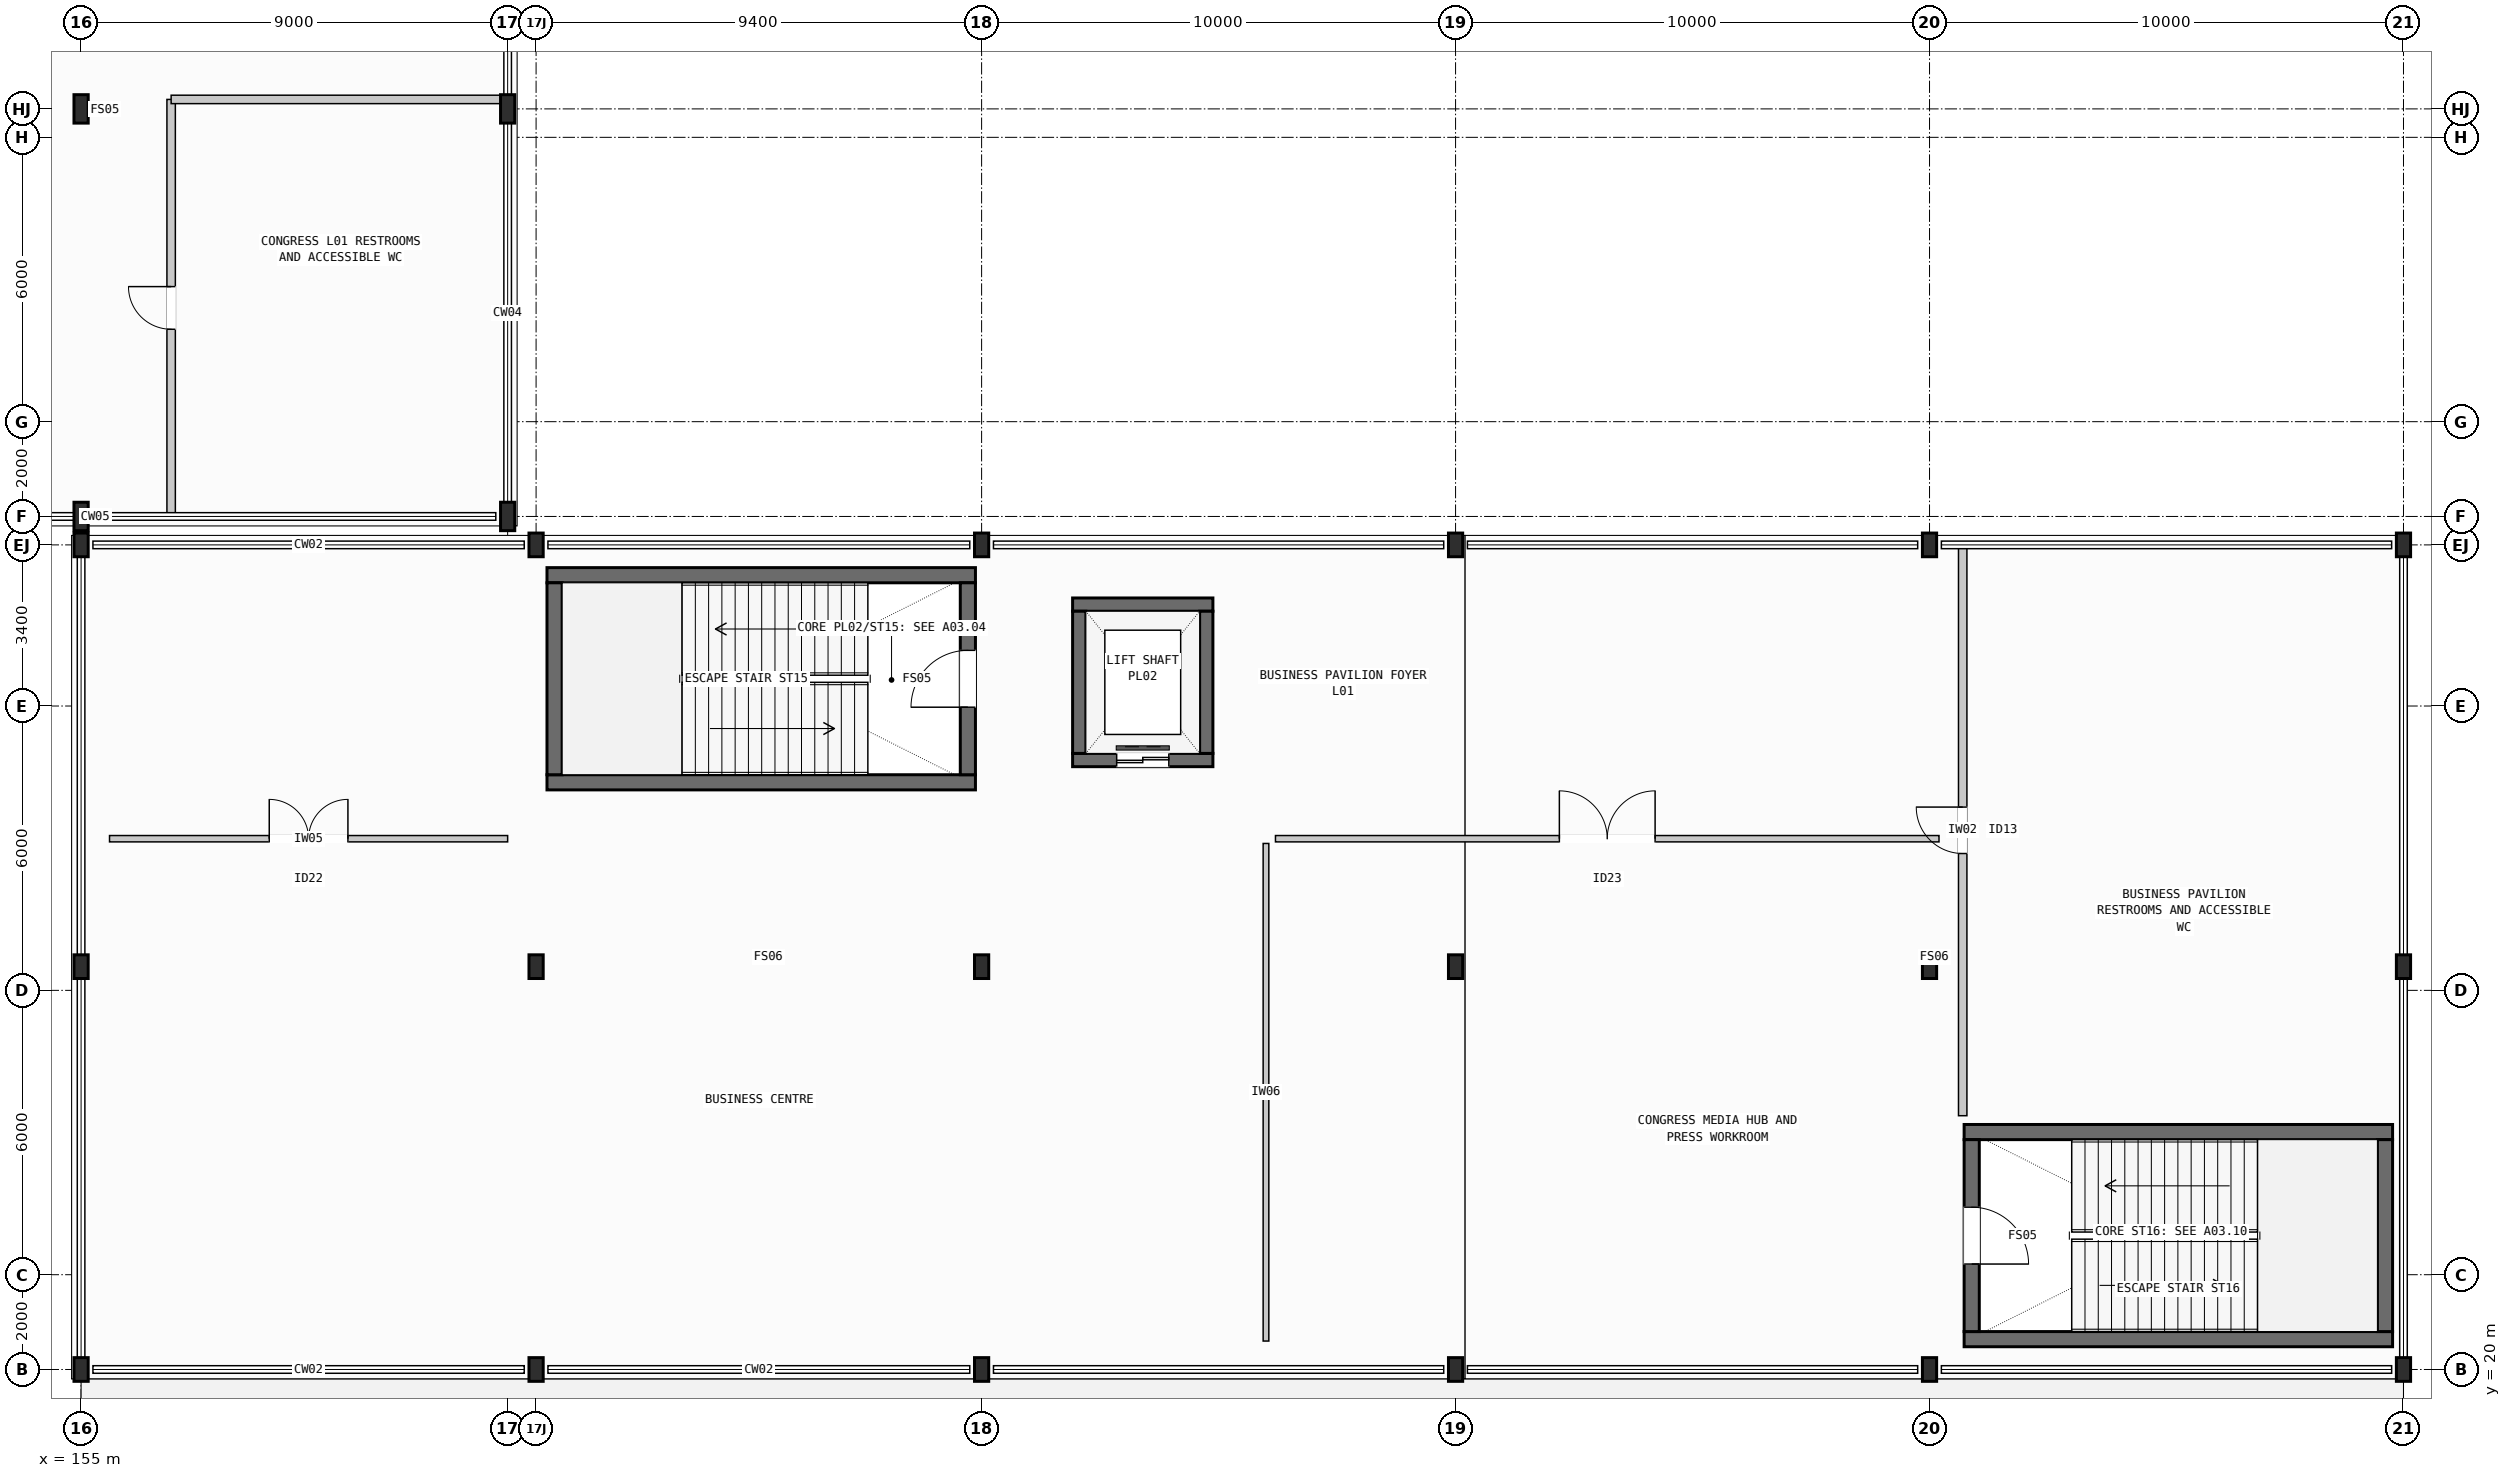
"""IFC4 building model, lengths in metres.
Left out: names, types, materials, properties, quantities, classifications, styles, units other than length and angle.
Written with IfcOpenShell. Run it as: python <this file> out.ifc"""

import sys

from ifc_helpers import new_model, si_unit, direction, frame, frame_2d, origin, origin_2d, place, context, subcontext, project, spatial, rectangle, i_section, extrude, element, fill, save


model = new_model("IFC4")
c1 = context("Model", 3, precision=1e-05, world=origin(), true_north=direction((0.0, 1.0)))
c2 = subcontext(c1, "Body", "Model", "MODEL_VIEW")
j1 = project(units=[si_unit("LENGTHUNIT", "METRE"), si_unit("PLANEANGLEUNIT", "RADIAN")], contexts=[c1])
p1 = place(None, origin())
s1 = spatial("IfcSite", under=j1, at=p1, CompositionType="ELEMENT")
p2 = place(p1, origin())
s2 = spatial("IfcBuilding", under=s1, at=p2, CompositionType="ELEMENT")
p3 = place(p2, frame((0.0, 0.0, 6.0)))
s3 = spatial("IfcBuildingStorey", under=s2, at=p3, CompositionType="ELEMENT", Elevation=6.0)
for number, where, z_axis, x_axis in (
    (1, (155.0, 20.0, 0.0), (0.0, 0.0, 1.0), (1.0, 0.0, 0.0)),
    (2, (155.0, 28.5, 0.0), (0.0, 0.0, 1.0), (1.0, 0.0, 0.0)),
    (3, (155.0, 37.4, 0.0), (0.0, 0.0, 1.0), (1.0, 0.0, 0.0)),
):
    element("IfcColumn", number, at=place(p3, frame(where, z_axis=z_axis, x_axis=x_axis)), inside=s3, PredefinedType="COLUMN", context=c2, shape_type="SweptSolid", body=[
        extrude(i_section(OverallWidth=0.3, OverallDepth=0.5, WebThickness=0.014, FlangeThickness=0.028, FilletRadius=0.027, at=origin_2d()), origin(), (0.0, 0.0, 1.0), 5.4),
    ])
for number, where, z_axis, x_axis in (
    (4, (155.0, 38.0, 0.0), (0.0, 0.0, 1.0), (1.0, 0.0, 0.0)),
    (5, (155.0, 46.6, 0.0), (0.0, 0.0, 1.0), (1.0, 0.0, 0.0)),
    (6, (164.0, 38.0, 0.0), (0.0, 0.0, 1.0), (1.0, 0.0, 0.0)),
    (7, (164.0, 46.6, 0.0), (0.0, 0.0, 1.0), (1.0, 0.0, 0.0)),
):
    element("IfcColumn", number, at=place(p3, frame(where, z_axis=z_axis, x_axis=x_axis)), inside=s3, PredefinedType="COLUMN", context=c2, shape_type="SweptSolid", body=[
        extrude(i_section(OverallWidth=0.3, OverallDepth=0.6, WebThickness=0.015, FlangeThickness=0.03, FilletRadius=0.027, at=origin_2d()), origin(), (0.0, 0.0, 1.0), 5.4),
    ])
for number, where, z_axis, x_axis in (
    (8, (164.6, 20.0, 0.0), (0.0, 0.0, 1.0), (1.0, 0.0, 0.0)),
    (9, (164.6, 28.5, 0.0), (0.0, 0.0, 1.0), (1.0, 0.0, 0.0)),
    (10, (164.6, 37.4, 0.0), (0.0, 0.0, 1.0), (1.0, 0.0, 0.0)),
    (11, (174.0, 20.0, 0.0), (0.0, 0.0, 1.0), (1.0, 0.0, 0.0)),
    (12, (174.0, 28.5, 0.0), (0.0, 0.0, 1.0), (1.0, 0.0, 0.0)),
    (13, (174.0, 37.4, 0.0), (0.0, 0.0, 1.0), (1.0, 0.0, 0.0)),
    (14, (184.0, 20.0, 0.0), (0.0, 0.0, 1.0), (1.0, 0.0, 0.0)),
    (15, (184.0, 28.5, 0.0), (0.0, 0.0, 1.0), (1.0, 0.0, 0.0)),
    (16, (184.0, 37.4, 0.0), (0.0, 0.0, 1.0), (1.0, 0.0, 0.0)),
    (17, (194.0, 20.0, 0.0), (0.0, 0.0, 1.0), (1.0, 0.0, 0.0)),
    (18, (194.0, 28.5, 0.0), (0.0, 0.0, 1.0), (1.0, 0.0, 0.0)),
    (19, (194.0, 37.4, 0.0), (0.0, 0.0, 1.0), (1.0, 0.0, 0.0)),
    (20, (204.0, 20.0, 0.0), (0.0, 0.0, 1.0), (1.0, 0.0, 0.0)),
    (21, (204.0, 28.5, 0.0), (0.0, 0.0, 1.0), (1.0, 0.0, 0.0)),
    (22, (204.0, 37.4, 0.0), (0.0, 0.0, 1.0), (1.0, 0.0, 0.0)),
):
    element("IfcColumn", number, at=place(p3, frame(where, z_axis=z_axis, x_axis=x_axis)), inside=s3, PredefinedType="COLUMN", context=c2, shape_type="SweptSolid", body=[
        extrude(i_section(OverallWidth=0.3, OverallDepth=0.5, WebThickness=0.014, FlangeThickness=0.028, FilletRadius=0.027, at=origin_2d()), origin(), (0.0, 0.0, 1.0), 5.4),
    ])
for number, where, z_axis, x_axis in (
    (23, (164.83, 32.39, 0.0), (0.0, 0.0, 1.0), (1.0, 0.0, 0.0)),
    (24, (164.83, 36.76, 0.0), (0.0, 0.0, 1.0), (1.0, 0.0, 0.0)),
):
    element("IfcWall", number, at=place(p3, frame(where, z_axis=z_axis, x_axis=x_axis)), inside=s3, PredefinedType="SHEAR", context=c2, shape_type="SweptSolid", body=[
        extrude(rectangle(XDim=9.04, YDim=0.32, at=frame_2d((4.52, 0.0))), origin(), (0.0, 0.0, 1.0), 5.4),
    ])
p4 = place(p3, frame((164.99, 32.55, 0.0), z_axis=(0.0, 0.0, 1.0), x_axis=(0.0, 1.0, 0.0)))
e25 = element("IfcWall", 25, at=p4, inside=s3, PredefinedType="SHEAR", context=c2, shape_type="SweptSolid", body=[
    extrude(rectangle(XDim=4.05, YDim=0.32, at=frame_2d((2.025, 0.0))), origin(), (0.0, 0.0, 1.0), 5.4),
])
p5 = place(p3, frame((173.71, 32.55, 0.0), z_axis=(0.0, 0.0, 1.0), x_axis=(0.0, 1.0, 0.0)))
e26 = element("IfcWall", 26, at=p5, inside=s3, PredefinedType="SHEAR", context=c2, shape_type="SweptSolid", body=[
    extrude(rectangle(XDim=4.05, YDim=0.32, at=frame_2d((2.025, 0.0))), origin(), (0.0, 0.0, 1.0), 5.4),
])
p6 = place(p5, frame((1.425, 0.0, 0.0)))
e27 = element("IfcOpeningElement", 27, at=p6, cuts=e26, PredefinedType="OPENING", context=c2, shape_type="SweptSolid", body=[
    extrude(rectangle(XDim=1.2, YDim=2.2, at=frame_2d((0.6, 1.1))), frame((0.0, 0.17, 0.0), z_axis=(0.0, -1.0, 0.0), x_axis=(1.0, 0.0, 0.0)), (0.0, 0.0, 1.0), 0.34),
])
for number, where, z_axis, x_axis in (
    (28, (194.73, 20.64, 0.0), (0.0, 0.0, 1.0), (1.0, 0.0, 0.0)),
    (29, (194.73, 25.01, 0.0), (0.0, 0.0, 1.0), (1.0, 0.0, 0.0)),
):
    element("IfcWall", number, at=place(p3, frame(where, z_axis=z_axis, x_axis=x_axis)), inside=s3, PredefinedType="SHEAR", context=c2, shape_type="SweptSolid", body=[
        extrude(rectangle(XDim=9.04, YDim=0.32, at=frame_2d((4.52, 0.0))), origin(), (0.0, 0.0, 1.0), 5.4),
    ])
p7 = place(p3, frame((194.89, 20.8, 0.0), z_axis=(0.0, 0.0, 1.0), x_axis=(0.0, 1.0, 0.0)))
e30 = element("IfcWall", 30, at=p7, inside=s3, PredefinedType="SHEAR", context=c2, shape_type="SweptSolid", body=[
    extrude(rectangle(XDim=4.05, YDim=0.32, at=frame_2d((2.025, 0.0))), origin(), (0.0, 0.0, 1.0), 5.4),
])
p8 = place(p7, frame((1.425, 0.0, 0.0)))
e31 = element("IfcOpeningElement", 31, at=p8, cuts=e30, PredefinedType="OPENING", context=c2, shape_type="SweptSolid", body=[
    extrude(rectangle(XDim=1.2, YDim=2.2, at=frame_2d((0.6, 1.1))), frame((0.0, 0.17, 0.0), z_axis=(0.0, -1.0, 0.0), x_axis=(1.0, 0.0, 0.0)), (0.0, 0.0, 1.0), 0.34),
])
p9 = place(p3, frame((203.61, 20.8, 0.0), z_axis=(0.0, 0.0, 1.0), x_axis=(0.0, 1.0, 0.0)))
e32 = element("IfcWall", 32, at=p9, inside=s3, PredefinedType="SHEAR", context=c2, shape_type="SweptSolid", body=[
    extrude(rectangle(XDim=4.05, YDim=0.32, at=frame_2d((2.025, 0.0))), origin(), (0.0, 0.0, 1.0), 5.4),
])
p10 = place(p3, frame((175.92, 32.86, 0.0), z_axis=(0.0, 0.0, 1.0), x_axis=(1.0, 0.0, 0.0)))
e33 = element("IfcWall", 33, at=p10, inside=s3, PredefinedType="SHEAR", context=c2, shape_type="SweptSolid", body=[
    extrude(rectangle(XDim=2.96, YDim=0.28, at=frame_2d((1.48, 0.0))), origin(), (0.0, 0.0, 1.0), 5.4),
])
p11 = place(p10, frame((0.93, 0.0, 0.0)))
e34 = element("IfcOpeningElement", 34, at=p11, cuts=e33, PredefinedType="OPENING", context=c2, shape_type="SweptSolid", body=[
    extrude(rectangle(XDim=1.1, YDim=2.15, at=frame_2d((0.55, 1.075))), frame((0.0, 0.15, 0.0), z_axis=(0.0, -1.0, 0.0), x_axis=(1.0, 0.0, 0.0)), (0.0, 0.0, 1.0), 0.3),
])
p12 = place(p3, frame((175.92, 36.14, 0.0), z_axis=(0.0, 0.0, 1.0), x_axis=(1.0, 0.0, 0.0)))
e35 = element("IfcWall", 35, at=p12, inside=s3, PredefinedType="SHEAR", context=c2, shape_type="SweptSolid", body=[
    extrude(rectangle(XDim=2.96, YDim=0.28, at=frame_2d((1.48, 0.0))), origin(), (0.0, 0.0, 1.0), 5.4),
])
for number, where, z_axis, x_axis in (
    (36, (176.06, 33.0, 0.0), (0.0, 0.0, 1.0), (0.0, 1.0, 0.0)),
    (37, (178.74, 33.0, 0.0), (0.0, 0.0, 1.0), (0.0, 1.0, 0.0)),
):
    element("IfcWall", number, at=place(p3, frame(where, z_axis=z_axis, x_axis=x_axis)), inside=s3, PredefinedType="SHEAR", context=c2, shape_type="SweptSolid", body=[
        extrude(rectangle(XDim=3.0, YDim=0.28, at=frame_2d((1.5, 0.0))), origin(), (0.0, 0.0, 1.0), 5.4),
    ])
p13 = place(p3, frame((156.9, 38.0, 0.0), z_axis=(0.0, 0.0, 1.0), x_axis=(0.0, 1.0, 0.0)))
e38 = element("IfcWall", 38, at=p13, inside=s3, PredefinedType="PARTITIONING", context=c2, shape_type="SweptSolid", body=[
    extrude(rectangle(XDim=8.8, YDim=0.178, at=frame_2d((4.4, 0.0))), origin(), (0.0, 0.0, 1.0), 4.4),
])
p14 = place(p13, frame((3.95, 0.0, 0.0)))
e39 = element("IfcOpeningElement", 39, at=p14, cuts=e38, PredefinedType="OPENING", context=c2, shape_type="SweptSolid", body=[
    extrude(rectangle(XDim=0.9, YDim=2.08, at=frame_2d((0.45, 1.04))), frame((0.0, 0.099, 0.0), z_axis=(0.0, -1.0, 0.0), x_axis=(1.0, 0.0, 0.0)), (0.0, 0.0, 1.0), 0.198),
])
p15 = place(p3, frame((156.9, 46.8, 0.0), z_axis=(0.0, 0.0, 1.0), x_axis=(1.0, 0.0, 0.0)))
e40 = element("IfcWall", 40, at=p15, inside=s3, PredefinedType="PARTITIONING", context=c2, shape_type="SweptSolid", body=[
    extrude(rectangle(XDim=7.1, YDim=0.178, at=frame_2d((3.55, 0.0))), origin(), (0.0, 0.0, 1.0), 4.4),
])
p16 = place(p3, frame((155.6, 31.2, 0.0), z_axis=(0.0, 0.0, 1.0), x_axis=(1.0, 0.0, 0.0)))
e41 = element("IfcWall", 41, at=p16, inside=s3, PredefinedType="PARTITIONING", context=c2, shape_type="SweptSolid", body=[
    extrude(rectangle(XDim=8.4, YDim=0.134, at=frame_2d((4.2, 0.0))), origin(), (0.0, 0.0, 1.0), 4.4),
])
p17 = place(p16, frame((3.37, 0.0, 0.0)))
e42 = element("IfcOpeningElement", 42, at=p17, cuts=e41, PredefinedType="OPENING", context=c2, shape_type="SweptSolid", body=[
    extrude(rectangle(XDim=1.66, YDim=2.38, at=frame_2d((0.83, 1.19))), frame((0.0, 0.077, 0.0), z_axis=(0.0, -1.0, 0.0), x_axis=(1.0, 0.0, 0.0)), (0.0, 0.0, 1.0), 0.154),
])
p18 = place(p3, frame((180.2, 31.2, 0.0), z_axis=(0.0, 0.0, 1.0), x_axis=(1.0, 0.0, 0.0)))
e43 = element("IfcWall", 43, at=p18, inside=s3, PredefinedType="PARTITIONING", context=c2, shape_type="SweptSolid", body=[
    extrude(rectangle(XDim=14.0, YDim=0.134, at=frame_2d((7.0, 0.0))), origin(), (0.0, 0.0, 1.0), 4.4),
])
p19 = place(p18, frame((5.99, 0.0, 0.0)))
e44 = element("IfcOpeningElement", 44, at=p19, cuts=e43, PredefinedType="OPENING", context=c2, shape_type="SweptSolid", body=[
    extrude(rectangle(XDim=2.02, YDim=2.46, at=frame_2d((1.01, 1.23))), frame((0.0, 0.077, 0.0), z_axis=(0.0, -1.0, 0.0), x_axis=(1.0, 0.0, 0.0)), (0.0, 0.0, 1.0), 0.154),
])
p20 = place(p3, frame((180.0, 20.6, 0.0), z_axis=(0.0, 0.0, 1.0), x_axis=(0.0, 1.0, 0.0)))
e45 = element("IfcWall", 45, at=p20, inside=s3, PredefinedType="PARTITIONING", context=c2, shape_type="SweptSolid", body=[
    extrude(rectangle(XDim=10.5, YDim=0.12, at=frame_2d((5.25, 0.0))), origin(), (0.0, 0.0, 1.0), 4.4),
])
p21 = place(p3, frame((194.7, 25.355, 0.0), z_axis=(0.0, 0.0, 1.0), x_axis=(0.0, 1.0, 0.0)))
e46 = element("IfcWall", 46, at=p21, inside=s3, PredefinedType="PARTITIONING", context=c2, shape_type="SweptSolid", body=[
    extrude(rectangle(XDim=12.045, YDim=0.178, at=frame_2d((6.022, 0.0))), origin(), (0.0, 0.0, 1.0), 4.4),
])
p22 = place(p21, frame((5.532, 0.0, 0.0)))
e47 = element("IfcOpeningElement", 47, at=p22, cuts=e46, PredefinedType="OPENING", context=c2, shape_type="SweptSolid", body=[
    extrude(rectangle(XDim=0.98, YDim=2.14, at=frame_2d((0.49, 1.07))), frame((0.0, 0.099, 0.0), z_axis=(0.0, -1.0, 0.0), x_axis=(1.0, 0.0, 0.0)), (0.0, 0.0, 1.0), 0.198),
])
p23 = place(p6, origin())
e48 = element("IfcDoor", 48, at=p23, inside=s3, OperationType="SINGLE_SWING_LEFT", PredefinedType="DOOR", context=c2, shape_type="SweptSolid", body=[
    extrude(rectangle(XDim=1.2, YDim=2.2, at=frame_2d((0.6, 1.1))), frame((0.0, 0.025, 0.0), z_axis=(0.0, -1.0, 0.0), x_axis=(1.0, 0.0, 0.0)), (0.0, 0.0, 1.0), 0.05),
])
fill(e27, e48)
p24 = place(p8, frame((1.2, 0.0, 0.0), z_axis=(0.0, 0.0, 1.0), x_axis=(-1.0, 0.0, 0.0)))
e49 = element("IfcDoor", 49, at=p24, inside=s3, OperationType="SINGLE_SWING_RIGHT", PredefinedType="DOOR", context=c2, shape_type="SweptSolid", body=[
    extrude(rectangle(XDim=1.2, YDim=2.2, at=frame_2d((0.6, 1.1))), frame((0.0, 0.025, 0.0), z_axis=(0.0, -1.0, 0.0), x_axis=(1.0, 0.0, 0.0)), (0.0, 0.0, 1.0), 0.05),
])
fill(e31, e49)
p25 = place(p11, origin())
e50 = element("IfcDoor", 50, at=p25, inside=s3, OperationType="DOUBLE_DOOR_SLIDING", PredefinedType="DOOR", context=c2, shape_type="SweptSolid", body=[
    extrude(rectangle(XDim=1.1, YDim=2.15, at=frame_2d((0.55, 1.075))), frame((0.0, 0.025, 0.0), z_axis=(0.0, -1.0, 0.0), x_axis=(1.0, 0.0, 0.0)), (0.0, 0.0, 1.0), 0.05),
])
fill(e34, e50)
p26 = place(p14, origin())
e51 = element("IfcDoor", 51, at=p26, inside=s3, OperationType="SINGLE_SWING_RIGHT", PredefinedType="DOOR", context=c2, shape_type="SweptSolid", body=[
    extrude(rectangle(XDim=0.9, YDim=2.08, at=frame_2d((0.45, 1.04))), frame((0.0, 0.025, 0.0), z_axis=(0.0, -1.0, 0.0), x_axis=(1.0, 0.0, 0.0)), (0.0, 0.0, 1.0), 0.05),
])
fill(e39, e51)
p27 = place(p17, origin())
e52 = element("IfcDoor", 52, at=p27, inside=s3, OperationType="DOUBLE_DOOR_SINGLE_SWING", PredefinedType="DOOR", context=c2, shape_type="SweptSolid", body=[
    extrude(rectangle(XDim=1.66, YDim=2.38, at=frame_2d((0.83, 1.19))), frame((0.0, 0.025, 0.0), z_axis=(0.0, -1.0, 0.0), x_axis=(1.0, 0.0, 0.0)), (0.0, 0.0, 1.0), 0.05),
])
fill(e42, e52)
p28 = place(p19, origin())
e53 = element("IfcDoor", 53, at=p28, inside=s3, OperationType="DOUBLE_DOOR_SINGLE_SWING", PredefinedType="DOOR", context=c2, shape_type="SweptSolid", body=[
    extrude(rectangle(XDim=2.02, YDim=2.46, at=frame_2d((1.01, 1.23))), frame((0.0, 0.025, 0.0), z_axis=(0.0, -1.0, 0.0), x_axis=(1.0, 0.0, 0.0)), (0.0, 0.0, 1.0), 0.05),
])
fill(e44, e53)
p29 = place(p22, origin())
e54 = element("IfcDoor", 54, at=p29, inside=s3, OperationType="SINGLE_SWING_RIGHT", PredefinedType="DOOR", context=c2, shape_type="SweptSolid", body=[
    extrude(rectangle(XDim=0.98, YDim=2.14, at=frame_2d((0.49, 1.07))), frame((0.0, 0.025, 0.0), z_axis=(0.0, -1.0, 0.0), x_axis=(1.0, 0.0, 0.0)), (0.0, 0.0, 1.0), 0.05),
])
fill(e47, e54)
save(model, sys.argv[1])
